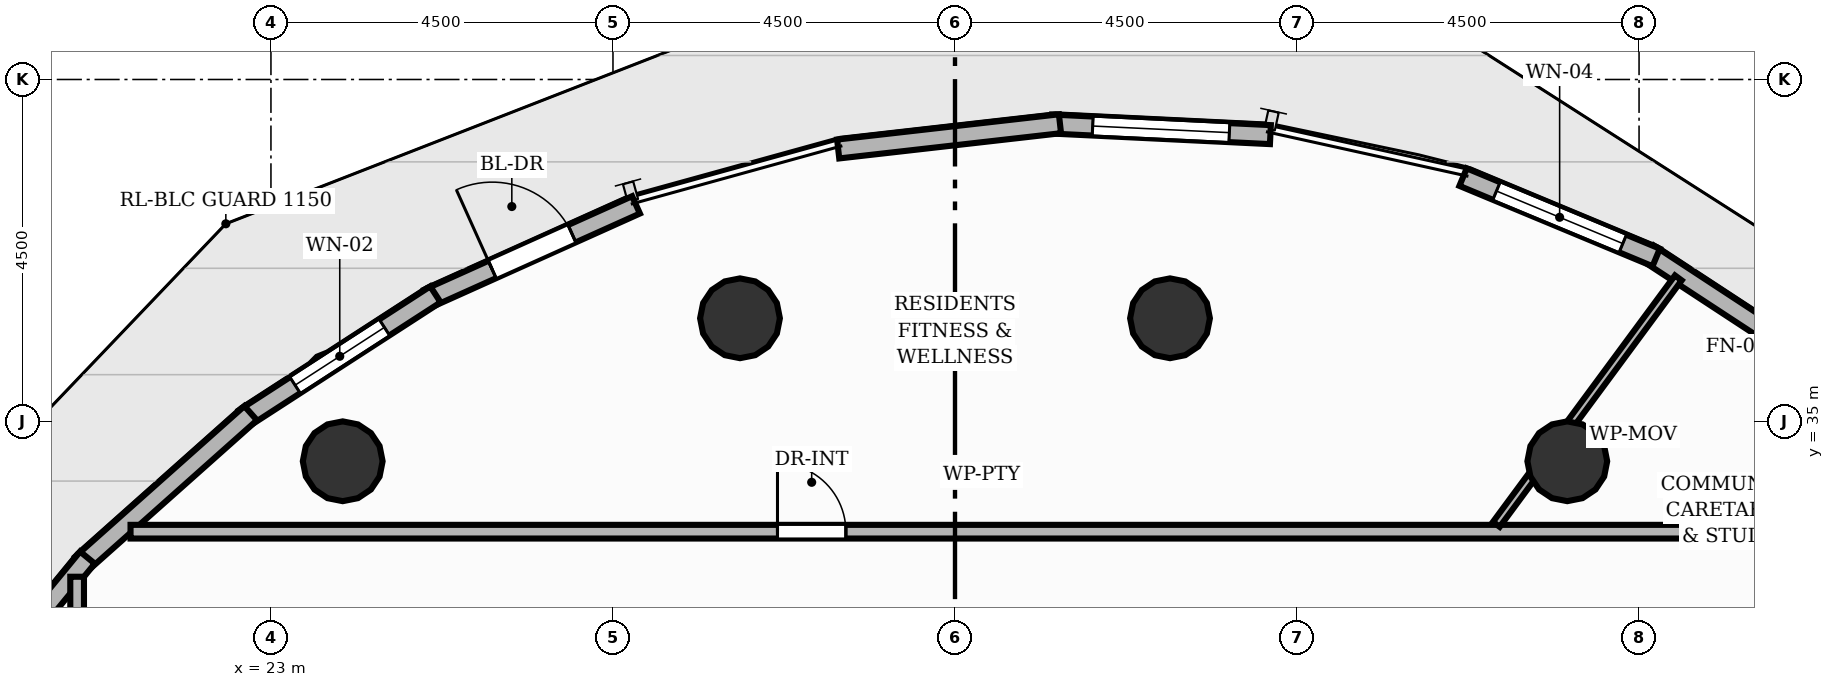
"""IFC4 building model, lengths in metres.
Left out: names, types, materials, properties, quantities, classifications, styles, units other than length and angle.
Written with IfcOpenShell. Run it as: python <this file> out.ifc"""

import sys

from ifc_helpers import new_model, si_unit, direction, frame, frame_2d, origin, origin_2d, place, context, subcontext, project, spatial, rectangle, circle, extrude, element, fill, save


model = new_model("IFC4")
c1 = context("Model", 3, precision=1e-05, world=origin(), true_north=direction((0.0, 1.0)))
c2 = subcontext(c1, "Body", "Model", "MODEL_VIEW")
j1 = project(units=[si_unit("LENGTHUNIT", "METRE"), si_unit("PLANEANGLEUNIT", "RADIAN")], contexts=[c1])
p1 = place(None, origin())
s1 = spatial("IfcSite", under=j1, at=p1, CompositionType="ELEMENT")
p2 = place(p1, origin())
s2 = spatial("IfcBuilding", under=s1, at=p2, CompositionType="ELEMENT")
p3 = place(p2, frame((0.0, 0.0, 116.96)))
s3 = spatial("IfcBuildingStorey", under=s2, at=p3, CompositionType="ELEMENT", Elevation=116.96)
for number, where, z_axis, x_axis in (
    (1, (40.056, 34.477, 0.0), (0.0, 0.0, 1.0), (1.0, 0.0, 0.0)),
    (2, (34.829, 36.358, 0.0), (0.0, 0.0, 1.0), (1.0, 0.0, 0.0)),
    (3, (29.171, 36.358, 0.0), (0.0, 0.0, 1.0), (1.0, 0.0, 0.0)),
    (4, (23.944, 34.477, 0.0), (0.0, 0.0, 1.0), (1.0, 0.0, 0.0)),
):
    element("IfcColumn", number, at=place(p3, frame(where, z_axis=z_axis, x_axis=x_axis)), inside=s3, PredefinedType="COLUMN", context=c2, shape_type="SweptSolid", body=[
        extrude(circle(Radius=0.525, at=origin_2d()), origin(), (0.0, 0.0, 1.0), 3.2),
    ])
p4 = place(p3, frame((41.126, 37.211, 0.0), z_axis=(0.0, 0.0, 1.0), x_axis=(0.836445365251, -0.5480503179, 0.0)))
e5 = element("IfcWall", 5, at=p4, inside=s3, PredefinedType="SOLIDWALL", context=c2, shape_type="SweptSolid", body=[
    extrude(rectangle(XDim=2.693, YDim=0.25, at=frame_2d((1.346, 0.0))), origin(), (0.0, 0.0, 1.0), 2.96),
])
p5 = place(p3, frame((38.685, 38.216, 0.0), z_axis=(0.0, 0.0, 1.0), x_axis=(0.923242191478, -0.384218500172, 0.0)))
e6 = element("IfcWall", 6, at=p5, inside=s3, PredefinedType="SOLIDWALL", context=c2, shape_type="SweptSolid", body=[
    extrude(rectangle(XDim=2.752, YDim=0.25, at=frame_2d((1.376, 0.0))), origin(), (0.0, 0.0, 1.0), 2.96),
])
p6 = place(p5, frame((0.476, 0.0, 0.85)))
e7 = element("IfcOpeningElement", 7, at=p6, cuts=e6, PredefinedType="OPENING", context=c2, shape_type="SweptSolid", body=[
    extrude(rectangle(XDim=1.8, YDim=2.0, at=frame_2d((0.9, 1.0))), frame((0.0, 0.135, 0.0), z_axis=(0.0, -1.0, 0.0), x_axis=(1.0, 0.0, 0.0)), (0.0, 0.0, 1.0), 0.27),
])
p7 = place(p3, frame((33.271, 38.914, 0.0), z_axis=(0.0, 0.0, 1.0), x_axis=(0.998829284317, -0.048374174838, 0.0)))
e8 = element("IfcWall", 8, at=p7, inside=s3, PredefinedType="SOLIDWALL", context=c2, shape_type="SweptSolid", body=[
    extrude(rectangle(XDim=2.882, YDim=0.25, at=frame_2d((1.441, 0.0))), origin(), (0.0, 0.0, 1.0), 2.96),
])
p8 = place(p7, frame((0.541, 0.0, 0.85)))
e9 = element("IfcOpeningElement", 9, at=p8, cuts=e8, PredefinedType="OPENING", context=c2, shape_type="SweptSolid", body=[
    extrude(rectangle(XDim=1.8, YDim=1.45, at=frame_2d((0.9, 0.725))), frame((0.0, 0.135, 0.0), z_axis=(0.0, -1.0, 0.0), x_axis=(1.0, 0.0, 0.0)), (0.0, 0.0, 1.0), 0.27),
])
p9 = place(p3, frame((30.463, 38.585, 0.0), z_axis=(0.0, 0.0, 1.0), x_axis=(0.993589349096, 0.113049570382, 0.0)))
e10 = element("IfcWall", 10, at=p9, inside=s3, PredefinedType="SOLIDWALL", context=c2, shape_type="SweptSolid", body=[
    extrude(rectangle(XDim=2.937, YDim=0.25, at=frame_2d((1.469, 0.0))), origin(), (0.0, 0.0, 1.0), 2.96),
])
p10 = place(p3, frame((25.069, 36.621, 0.0), z_axis=(0.0, 0.0, 1.0), x_axis=(0.912043359661, 0.410093782076, 0.0)))
e11 = element("IfcWall", 11, at=p10, inside=s3, PredefinedType="SOLIDWALL", context=c2, shape_type="SweptSolid", body=[
    extrude(rectangle(XDim=2.998, YDim=0.25, at=frame_2d((1.499, 0.0))), origin(), (0.0, 0.0, 1.0), 2.96),
])
p11 = place(p10, frame((0.924, 0.0, 0.0)))
e12 = element("IfcOpeningElement", 12, at=p11, cuts=e11, PredefinedType="OPENING", context=c2, shape_type="SweptSolid", body=[
    extrude(rectangle(XDim=1.15, YDim=2.2, at=frame_2d((0.575, 1.1))), frame((0.0, 0.135, 0.0), z_axis=(0.0, -1.0, 0.0), x_axis=(1.0, 0.0, 0.0)), (0.0, 0.0, 1.0), 0.27),
])
p12 = place(p3, frame((22.647, 35.044, 0.0), z_axis=(0.0, 0.0, 1.0), x_axis=(0.839563603446, 0.543261406478, 0.0)))
e13 = element("IfcWall", 13, at=p12, inside=s3, PredefinedType="SOLIDWALL", context=c2, shape_type="SweptSolid", body=[
    extrude(rectangle(XDim=2.998, YDim=0.25, at=frame_2d((1.499, 0.0))), origin(), (0.0, 0.0, 1.0), 2.96),
])
p13 = place(p12, frame((0.799, 0.0, 0.85)))
e14 = element("IfcOpeningElement", 14, at=p13, cuts=e13, PredefinedType="OPENING", context=c2, shape_type="SweptSolid", body=[
    extrude(rectangle(XDim=1.4, YDim=1.45, at=frame_2d((0.7, 0.725))), frame((0.0, 0.135, 0.0), z_axis=(0.0, -1.0, 0.0), x_axis=(1.0, 0.0, 0.0)), (0.0, 0.0, 1.0), 0.27),
])
p14 = place(p3, frame((20.51, 33.13, 0.0), z_axis=(0.0, 0.0, 1.0), x_axis=(0.746920467444, 0.664913389332, 0.0)))
e15 = element("IfcWall", 15, at=p14, inside=s3, PredefinedType="SOLIDWALL", context=c2, shape_type="SweptSolid", body=[
    extrude(rectangle(XDim=2.977, YDim=0.25, at=frame_2d((1.489, 0.0))), origin(), (0.0, 0.0, 1.0), 2.96),
])
p15 = place(p3, frame((18.722, 30.938, 0.0), z_axis=(0.0, 0.0, 1.0), x_axis=(0.634328076021, 0.7730639637, 0.0)))
e16 = element("IfcWall", 16, at=p15, inside=s3, PredefinedType="SOLIDWALL", context=c2, shape_type="SweptSolid", body=[
    extrude(rectangle(XDim=2.937, YDim=0.25, at=frame_2d((1.469, 0.0))), origin(), (0.0, 0.0, 1.0), 2.96),
])
p16 = place(p3, frame((21.153, 33.55, 0.0), z_axis=(0.0, 0.0, 1.0), x_axis=(1.0, 0.0, 0.0)))
e17 = element("IfcWall", 17, at=p16, inside=s3, PredefinedType="PARTITIONING", context=c2, shape_type="SweptSolid", body=[
    extrude(rectangle(XDim=22.397, YDim=0.18, at=frame_2d((11.199, 0.0))), origin(), (0.0, 0.0, 1.0), 2.955),
])
p17 = place(p16, frame((8.512, 0.0, 0.0)))
e18 = element("IfcOpeningElement", 18, at=p17, cuts=e17, PredefinedType="OPENING", context=c2, shape_type="SweptSolid", body=[
    extrude(rectangle(XDim=0.9, YDim=2.1, at=frame_2d((0.45, 1.05))), frame((0.0, 0.1, 0.0), z_axis=(0.0, -1.0, 0.0), x_axis=(1.0, 0.0, 0.0)), (0.0, 0.0, 1.0), 0.2),
])
p18 = place(p3, frame((20.45, 14.45, 0.0), z_axis=(0.0, 0.0, 1.0), x_axis=(0.0, 1.0, 0.0)))
e19 = element("IfcWall", 19, at=p18, inside=s3, PredefinedType="PARTITIONING", context=c2, shape_type="SweptSolid", body=[
    extrude(rectangle(XDim=18.507, YDim=0.18, at=frame_2d((9.254, 0.0))), origin(), (0.0, 0.0, 1.0), 2.955),
])
p19 = place(p18, frame((8.804, 0.0, 0.0)))
e20 = element("IfcOpeningElement", 20, at=p19, cuts=e19, PredefinedType="OPENING", context=c2, shape_type="SweptSolid", body=[
    extrude(rectangle(XDim=0.9, YDim=2.1, at=frame_2d((0.45, 1.05))), frame((0.0, 0.1, 0.0), z_axis=(0.0, -1.0, 0.0), x_axis=(1.0, 0.0, 0.0)), (0.0, 0.0, 1.0), 0.2),
])
p20 = place(p3, frame((41.517, 36.889, 0.0), z_axis=(0.0, 0.0, 1.0), x_axis=(-0.593954984118, -0.804498276469, 0.0)))
e21 = element("IfcWall", 21, at=p20, inside=s3, PredefinedType="MOVABLE", context=c2, shape_type="SweptSolid", body=[
    extrude(rectangle(XDim=4.031, YDim=0.11, at=frame_2d((2.015, 0.0))), origin(), (0.0, 0.0, 1.0), 2.336),
])
p21 = place(p11, origin())
e22 = element("IfcDoor", 22, at=p21, inside=s3, OperationType="SINGLE_SWING_LEFT", PredefinedType="DOOR", context=c2, shape_type="SweptSolid", body=[
    extrude(rectangle(XDim=1.15, YDim=2.2, at=frame_2d((0.575, 1.1))), frame((0.0, 0.025, 0.0), z_axis=(0.0, -1.0, 0.0), x_axis=(1.0, 0.0, 0.0)), (0.0, 0.0, 1.0), 0.05),
])
fill(e12, e22)
p22 = place(p6, origin())
e23 = element("IfcWindow", 23, at=p22, inside=s3, PartitioningType="SINGLE_PANEL", PredefinedType="WINDOW", context=c2, shape_type="SweptSolid", body=[
    extrude(rectangle(XDim=1.8, YDim=2.0, at=frame_2d((0.9, 1.0))), frame((0.0, 0.03, 0.0), z_axis=(0.0, -1.0, 0.0), x_axis=(1.0, 0.0, 0.0)), (0.0, 0.0, 1.0), 0.06),
])
fill(e7, e23)
p23 = place(p8, origin())
e24 = element("IfcWindow", 24, at=p23, inside=s3, PartitioningType="SINGLE_PANEL", PredefinedType="WINDOW", context=c2, shape_type="SweptSolid", body=[
    extrude(rectangle(XDim=1.8, YDim=1.45, at=frame_2d((0.9, 0.725))), frame((0.0, 0.03, 0.0), z_axis=(0.0, -1.0, 0.0), x_axis=(1.0, 0.0, 0.0)), (0.0, 0.0, 1.0), 0.06),
])
fill(e9, e24)
p24 = place(p13, origin())
e25 = element("IfcWindow", 25, at=p24, inside=s3, PartitioningType="SINGLE_PANEL", PredefinedType="WINDOW", context=c2, shape_type="SweptSolid", body=[
    extrude(rectangle(XDim=1.4, YDim=1.45, at=frame_2d((0.7, 0.725))), frame((0.0, 0.03, 0.0), z_axis=(0.0, -1.0, 0.0), x_axis=(1.0, 0.0, 0.0)), (0.0, 0.0, 1.0), 0.06),
])
fill(e14, e25)
p25 = place(p17, origin())
e26 = element("IfcDoor", 26, at=p25, inside=s3, OperationType="SINGLE_SWING_LEFT", PredefinedType="DOOR", context=c2, shape_type="SweptSolid", body=[
    extrude(rectangle(XDim=0.9, YDim=2.1, at=frame_2d((0.45, 1.05))), frame((0.0, 0.025, 0.0), z_axis=(0.0, -1.0, 0.0), x_axis=(1.0, 0.0, 0.0)), (0.0, 0.0, 1.0), 0.05),
])
fill(e18, e26)
save(model, sys.argv[1])
